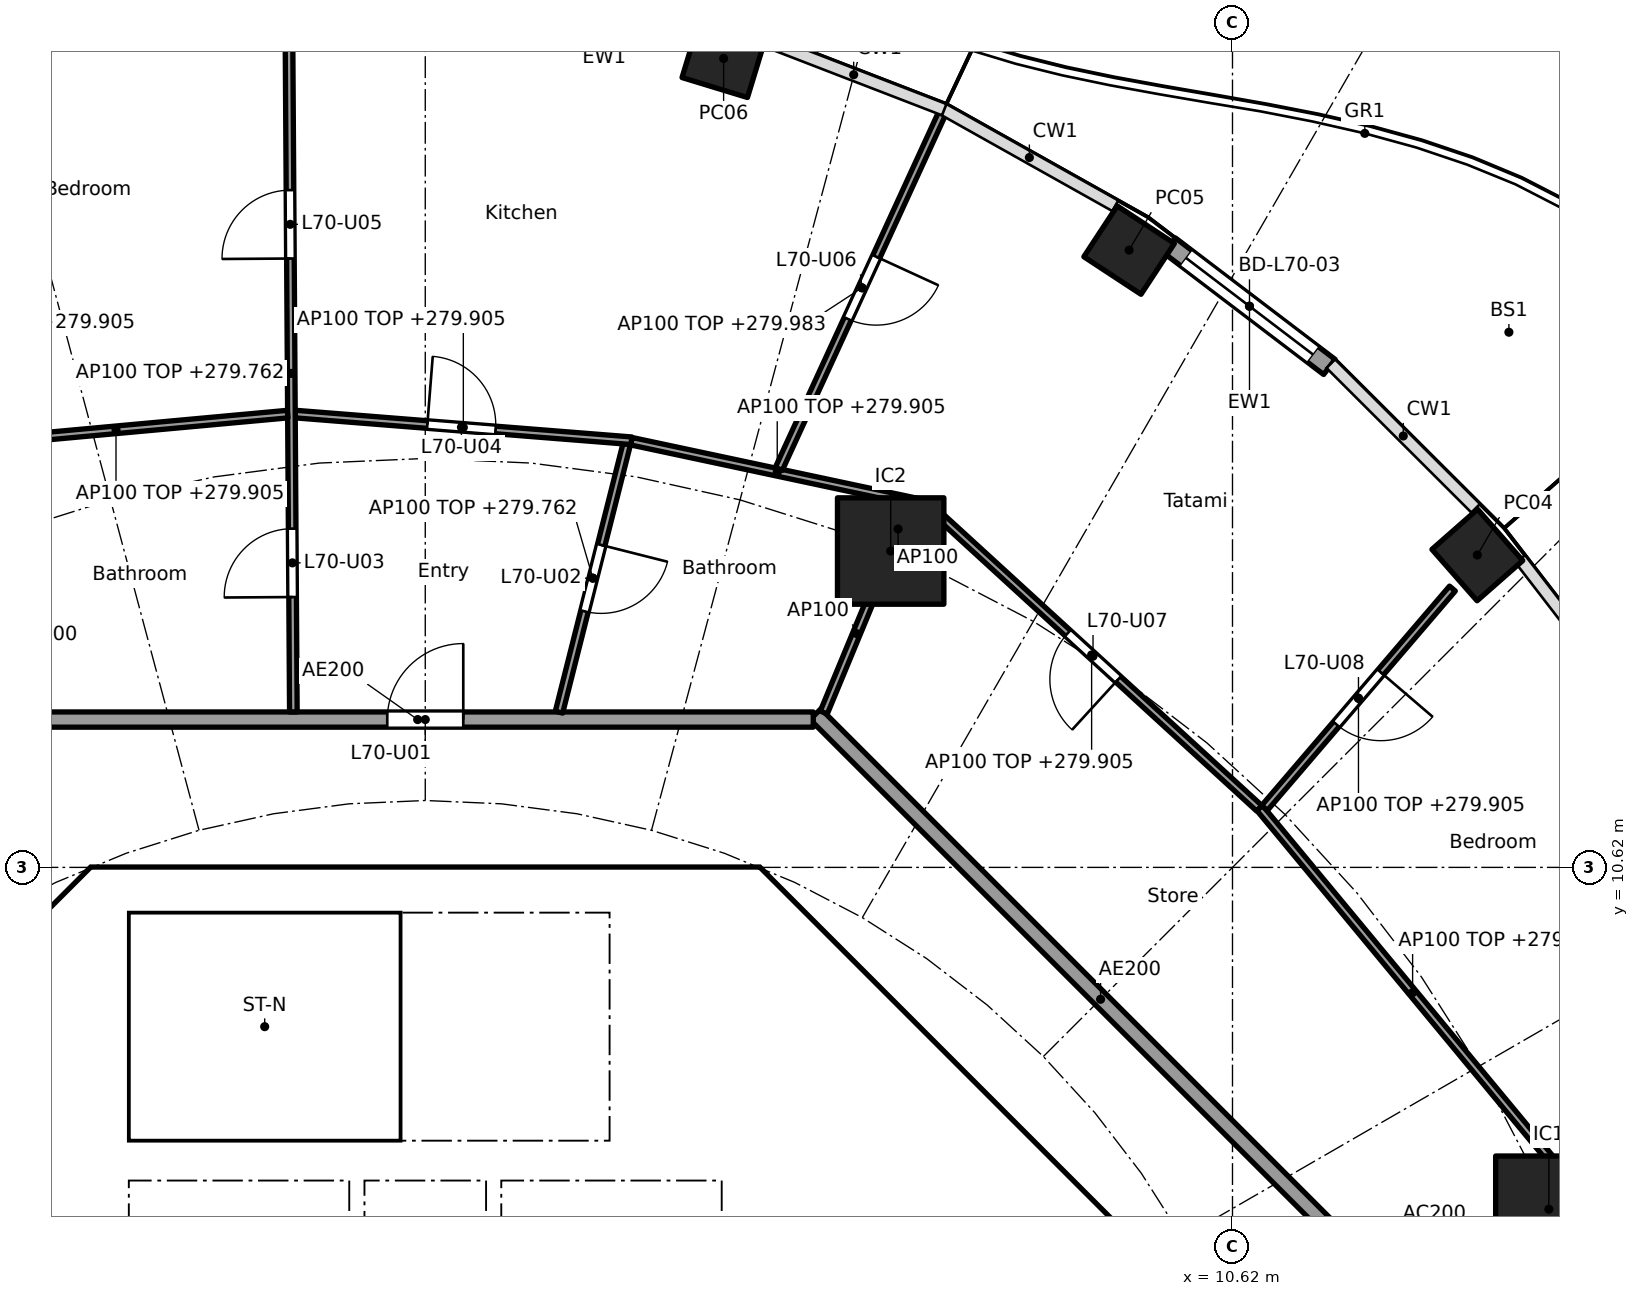
"""IFC4 building model, lengths in metres.
Left out: names, types, materials, properties, quantities, classifications, styles, units other than length and angle.
Written with IfcOpenShell. Run it as: python <this file> out.ifc"""

import sys

from ifc_helpers import new_model, si_unit, direction, frame, frame_2d, origin, origin_2d, place, context, subcontext, project, spatial, polyline, rectangle, hollow_rectangle, outline, extrude, element, fill, save


model = new_model("IFC4")
c1 = context("Model", 3, precision=1e-05, world=origin(), true_north=direction((0.0, 1.0)))
c2 = subcontext(c1, "Body", "Model", "MODEL_VIEW")
j1 = project(units=[si_unit("LENGTHUNIT", "METRE"), si_unit("PLANEANGLEUNIT", "RADIAN")], contexts=[c1])
p1 = place(None, origin())
s1 = spatial("IfcSite", under=j1, at=p1, CompositionType="ELEMENT")
p2 = place(p1, origin())
s2 = spatial("IfcBuilding", under=s1, at=p2, CompositionType="ELEMENT")
p3 = place(p2, frame((0.0, 0.0, 277.0)))
s3 = spatial("IfcBuildingStorey", under=s2, at=p3, CompositionType="ELEMENT", Elevation=277.0)
for number, where, z_axis, x_axis in (
    (1, (13.841, 14.73, 0.0), (0.0, 0.0, 1.0), (-0.66, 0.751, 0.0)),
    (2, (9.26, 18.741, 0.0), (0.0, 0.0, 1.0), (-0.836, 0.549, 0.0)),
    (3, (3.925, 21.262, 0.0), (0.0, 0.0, 1.0), (-0.957, 0.292, 0.0)),
):
    element("IfcColumn", number, at=place(p3, frame(where, z_axis=z_axis, x_axis=x_axis)), inside=s3, PredefinedType="COLUMN", context=c2, shape_type="SweptSolid", body=[
        extrude(hollow_rectangle(XDim=0.9, YDim=0.8, WallThickness=0.028, at=origin_2d()), origin(), (0.0, 0.0, 1.0), 3.7),
    ])
for number, where, z_axis, x_axis in (
    (4, (14.782, 6.123, 0.0), (0.0, 0.0, 1.0), (1.0, 0.0, 0.0)),
    (5, (6.123, 14.782, 0.0), (0.0, 0.0, 1.0), (1.0, 0.0, 0.0)),
):
    element("IfcColumn", number, at=place(p3, frame(where, z_axis=z_axis, x_axis=x_axis)), inside=s3, PredefinedType="COLUMN", context=c2, shape_type="SweptSolid", body=[
        extrude(rectangle(XDim=1.4, YDim=1.4, at=origin_2d()), origin(), (0.0, 0.0, 1.0), 3.7),
    ])
p4 = place(p3, frame((9.792, 18.802, 0.0), z_axis=(0.0, 0.0, 1.0), x_axis=(0.796010739377, -0.605282498339, 0.0)))
e6 = element("IfcWall", 6, at=p4, inside=s3, PredefinedType="SOLIDWALL", context=c2, shape_type="SweptSolid", body=[
    extrude(rectangle(XDim=2.641, YDim=0.25, at=frame_2d((1.32, 0.0))), origin(), (0.0, 0.0, 1.0), 3.44),
])
p5 = place(p4, frame((0.27, 0.0, 0.0)))
e7 = element("IfcOpeningElement", 7, at=p5, cuts=e6, PredefinedType="OPENING", context=c2, shape_type="SweptSolid", body=[
    extrude(rectangle(XDim=2.1, YDim=2.4, at=frame_2d((1.05, 1.2))), frame((0.0, 0.135, 0.0), z_axis=(0.0, -1.0, 0.0), x_axis=(1.0, 0.0, 0.0)), (0.0, 0.0, 1.0), 0.27),
])
p6 = place(p3, frame((9.988, 4.613, 0.0), z_axis=(0.0, 0.0, 1.0), x_axis=(-0.707106781187, 0.707106781187, 0.0)))
e8 = element("IfcWall", 8, at=p6, inside=s3, PredefinedType="SHEAR", context=c2, shape_type="SweptSolid", body=[
    extrude(rectangle(XDim=7.602, YDim=0.6, at=frame_2d((3.801, 0.0))), origin(), (0.0, 0.0, 1.0), 3.44),
])
p7 = place(p6, frame((3.201, 0.0, 0.0)))
e9 = element("IfcOpeningElement", 9, at=p7, cuts=e8, PredefinedType="OPENING", context=c2, shape_type="SweptSolid", body=[
    extrude(rectangle(XDim=1.2, YDim=2.1, at=frame_2d((0.6, 1.05))), frame((0.0, 0.31, 0.0), z_axis=(0.0, -1.0, 0.0), x_axis=(1.0, 0.0, 0.0)), (0.0, 0.0, 1.0), 0.62),
])
p8 = place(p3, frame((-4.613, 9.988, 0.0), z_axis=(0.0, 0.0, 1.0), x_axis=(-0.707106781187, -0.707106781187, 0.0)))
e10 = element("IfcWall", 10, at=p8, inside=s3, PredefinedType="SHEAR", context=c2, shape_type="SweptSolid", body=[
    extrude(rectangle(XDim=7.602, YDim=0.6, at=frame_2d((3.801, 0.0))), origin(), (0.0, 0.0, 1.0), 3.44),
])
p9 = place(p8, frame((0.351, 0.0, 0.0)))
e11 = element("IfcOpeningElement", 11, at=p9, cuts=e10, PredefinedType="OPENING", context=c2, shape_type="SweptSolid", body=[
    extrude(rectangle(XDim=1.1, YDim=2.1, at=frame_2d((0.55, 1.05))), frame((0.0, 0.31, 0.0), z_axis=(0.0, -1.0, 0.0), x_axis=(1.0, 0.0, 0.0)), (0.0, 0.0, 1.0), 0.62),
])
p10 = place(p3, frame((4.0, 4.3, 0.0), z_axis=(0.0, 0.0, 1.0), x_axis=(0.0, 1.0, 0.0)))
e12 = element("IfcWall", 12, at=p10, inside=s3, PredefinedType="SOLIDWALL", context=c2, shape_type="SweptSolid", body=[
    extrude(rectangle(XDim=2.2, YDim=0.2, at=frame_2d((1.1, 0.0))), origin(), (0.0, 0.0, 1.0), 3.44),
])
p11 = place(p10, frame((0.55, 0.0, 0.0)))
e13 = element("IfcOpeningElement", 13, at=p11, cuts=e12, PredefinedType="OPENING", context=c2, shape_type="SweptSolid", body=[
    extrude(rectangle(XDim=1.1, YDim=2.1, at=frame_2d((0.55, 1.05))), frame((0.0, 0.11, 0.0), z_axis=(0.0, -1.0, 0.0), x_axis=(1.0, 0.0, 0.0)), (0.0, 0.0, 1.0), 0.22),
])
p12 = place(p3, frame((-4.0, 4.3, 0.0), z_axis=(0.0, 0.0, 1.0), x_axis=(0.0, 1.0, 0.0)))
e14 = element("IfcWall", 14, at=p12, inside=s3, PredefinedType="SOLIDWALL", context=c2, shape_type="SweptSolid", body=[
    extrude(rectangle(XDim=2.2, YDim=0.2, at=frame_2d((1.1, 0.0))), origin(), (0.0, 0.0, 1.0), 3.44),
])
p13 = place(p12, frame((0.55, 0.0, 0.0)))
e15 = element("IfcOpeningElement", 15, at=p13, cuts=e14, PredefinedType="OPENING", context=c2, shape_type="SweptSolid", body=[
    extrude(rectangle(XDim=1.1, YDim=2.1, at=frame_2d((0.55, 1.05))), frame((0.0, 0.11, 0.0), z_axis=(0.0, -1.0, 0.0), x_axis=(1.0, 0.0, 0.0)), (0.0, 0.0, 1.0), 0.22),
])
p14 = place(p3, frame((4.0, 7.025, 0.0), z_axis=(0.0, 0.0, 1.0), x_axis=(0.0, 1.0, 0.0)))
e16 = element("IfcWall", 16, at=p14, inside=s3, PredefinedType="SOLIDWALL", context=c2, shape_type="SweptSolid", body=[
    extrude(rectangle(XDim=3.0, YDim=0.2, at=frame_2d((1.5, 0.0))), origin(), (0.0, 0.0, 1.0), 3.44),
])
p15 = place(p14, frame((0.925, 0.0, 0.0)))
e17 = element("IfcOpeningElement", 17, at=p15, cuts=e16, PredefinedType="OPENING", context=c2, shape_type="SweptSolid", body=[
    extrude(rectangle(XDim=1.1, YDim=2.1, at=frame_2d((0.55, 1.05))), frame((0.0, 0.11, 0.0), z_axis=(0.0, -1.0, 0.0), x_axis=(1.0, 0.0, 0.0)), (0.0, 0.0, 1.0), 0.22),
])
p16 = place(p3, origin())
e18 = element("IfcWall", 18, at=p16, inside=s3, PredefinedType="SHEAR", context=c2, shape_type="SweptSolid", body=[
    extrude(outline(polyline([(-4.152, 10.025), (-4.401, 9.776), (-4.825, 10.2), (-4.401, 10.625), (4.401, 10.625), (4.825, 10.2), (4.401, 9.776), (4.152, 10.025), (-4.152, 10.025)])), origin(), (0.0, 0.0, 1.0), 3.44),
])
for number, where, z_axis, x_axis in (
    (19, (-0.9, 4.3, 0.0), (0.0, 0.0, 1.0), (0.0, 1.0, 0.0)),
    (20, (0.9, 4.3, 0.0), (0.0, 0.0, 1.0), (0.0, 1.0, 0.0)),
):
    element("IfcWall", number, at=place(p3, frame(where, z_axis=z_axis, x_axis=x_axis)), inside=s3, PredefinedType="SOLIDWALL", context=c2, shape_type="SweptSolid", body=[
        extrude(rectangle(XDim=2.2, YDim=0.2, at=frame_2d((1.1, 0.0))), origin(), (0.0, 0.0, 1.0), 3.44),
    ])
p17 = place(p3, origin())
e21 = element("IfcWall", 21, at=p17, inside=s3, PredefinedType="SOLIDWALL", context=c2, shape_type="SweptSolid", body=[
    extrude(outline(polyline([(-3.9, 7.025), (-4.1, 7.025), (-4.1, 10.025), (-3.9, 10.025), (-3.9, 7.025)])), origin(), (0.0, 0.0, 1.0), 3.44),
])
p18 = place(p3, origin())
e22 = element("IfcWall", 22, at=p18, inside=s3, PredefinedType="SOLIDWALL", context=c2, shape_type="SweptSolid", body=[
    extrude(outline(polyline([(4.1, 6.5), (-4.1, 6.5), (-4.1, 7.025), (4.1, 7.025), (4.1, 6.5)])), origin(), (0.0, 0.0, 1.0), 3.44),
])
p19 = place(p3, frame((12.657, 5.243, 0.0), z_axis=(0.0, 0.0, 1.0), x_axis=(0.923853160736, 0.382747093259, 0.0)))
e23 = element("IfcWall", 23, at=p19, inside=s3, PredefinedType="PARTITIONING", context=c2, shape_type="SweptSolid", body=[
    extrude(rectangle(XDim=2.2, YDim=0.2, at=frame_2d((1.1, 0.0))), origin(), (0.0, 0.0, 1.0), 3.44),
])
p20 = place(p3, frame((14.814, 6.161, 0.0), z_axis=(0.0, 0.0, 1.0), x_axis=(0.638050520313, 0.769994502272, 0.0)))
e24 = element("IfcWall", 24, at=p20, inside=s3, PredefinedType="PARTITIONING", context=c2, shape_type="SweptSolid", body=[
    extrude(rectangle(XDim=3.673, YDim=0.2, at=frame_2d((1.836, 0.0))), origin(), (0.0, 0.0, 1.0), 3.44),
])
p21 = place(p3, frame((12.635, 5.134, 0.0), z_axis=(0.0, 0.0, 1.0), x_axis=(-0.707106781187, 0.707106781187, 0.0)))
e25 = element("IfcWall", 25, at=p21, inside=s3, PredefinedType="PARTITIONING", context=c2, shape_type="SweptSolid", body=[
    extrude(rectangle(XDim=10.609, YDim=0.2, at=frame_2d((5.305, 0.0))), origin(), (0.0, 0.0, 1.0), 3.44),
])
p22 = place(p3, frame((5.104, 12.565, 0.0), z_axis=(0.0, 0.0, 1.0), x_axis=(-1.0, 0.0, 0.0)))
e26 = element("IfcWall", 26, at=p22, inside=s3, PredefinedType="PARTITIONING", context=c2, shape_type="SweptSolid", body=[
    extrude(rectangle(XDim=10.409, YDim=0.2, at=frame_2d((5.205, 0.0))), origin(), (0.0, 0.0, 1.0), 3.44),
])
p23 = place(p22, frame((4.604, 0.0, 0.0)))
e27 = element("IfcOpeningElement", 27, at=p23, cuts=e26, PredefinedType="OPENING", context=c2, shape_type="SweptSolid", body=[
    extrude(rectangle(XDim=1.0, YDim=2.1, at=frame_2d((0.5, 1.05))), frame((0.0, 0.11, 0.0), z_axis=(0.0, -1.0, 0.0), x_axis=(1.0, 0.0, 0.0)), (0.0, 0.0, 1.0), 0.22),
])
p24 = place(p3, frame((15.002, 6.543, 0.0), z_axis=(0.0, 0.0, 1.0), x_axis=(-0.637932656528, 0.770092154054, 0.0)))
e28 = element("IfcWall", 28, at=p24, inside=s3, PredefinedType="PARTITIONING", context=c2, shape_type="SweptSolid", body=[
    extrude(rectangle(XDim=6.311, YDim=0.1, at=frame_2d((3.155, 0.0))), origin(), (0.0, 0.0, 1.0), 2.905),
])
p25 = place(p3, frame((11.041, 11.402, 0.0), z_axis=(0.0, 0.0, 1.0), x_axis=(0.650558544325, 0.759456108282, 0.0)))
e29 = element("IfcWall", 29, at=p25, inside=s3, PredefinedType="PARTITIONING", context=c2, shape_type="SweptSolid", body=[
    extrude(rectangle(XDim=3.8, YDim=0.1, at=frame_2d((1.9, 0.0))), origin(), (0.0, 0.0, 1.0), 2.905),
])
p26 = place(p25, frame((1.45, 0.0, 0.0)))
e30 = element("IfcOpeningElement", 30, at=p26, cuts=e29, PredefinedType="OPENING", context=c2, shape_type="SweptSolid", body=[
    extrude(rectangle(XDim=0.9, YDim=2.1, at=frame_2d((0.45, 1.05))), frame((0.0, 0.06, 0.0), z_axis=(0.0, -1.0, 0.0), x_axis=(1.0, 0.0, 0.0)), (0.0, 0.0, 1.0), 0.12),
])
p27 = place(p3, frame((10.972, 11.398, 0.0), z_axis=(0.0, 0.0, 1.0), x_axis=(-0.737838738013, 0.674977034193, 0.0)))
e31 = element("IfcWall", 31, at=p27, inside=s3, PredefinedType="PARTITIONING", context=c2, shape_type="SweptSolid", body=[
    extrude(rectangle(XDim=5.977, YDim=0.1, at=frame_2d((2.989, 0.0))), origin(), (0.0, 0.0, 1.0), 2.905),
])
p28 = place(p27, frame((2.514, 0.0, 0.0)))
e32 = element("IfcOpeningElement", 32, at=p28, cuts=e31, PredefinedType="OPENING", context=c2, shape_type="SweptSolid", body=[
    extrude(rectangle(XDim=0.9, YDim=2.1, at=frame_2d((0.45, 1.05))), frame((0.0, 0.06, 0.0), z_axis=(0.0, -1.0, 0.0), x_axis=(1.0, 0.0, 0.0)), (0.0, 0.0, 1.0), 0.12),
])
p29 = place(p3, frame((5.243, 12.657, 0.0), z_axis=(0.0, 0.0, 1.0), x_axis=(0.382719158442, 0.923864733477, 0.0)))
e33 = element("IfcWall", 33, at=p29, inside=s3, PredefinedType="PARTITIONING", context=c2, shape_type="SweptSolid", body=[
    extrude(rectangle(XDim=2.25, YDim=0.1, at=frame_2d((1.125, 0.0))), origin(), (0.0, 0.0, 1.0), 3.44),
])
p30 = place(p3, frame((6.55, 15.409, 0.0), z_axis=(0.0, 0.0, 1.0), x_axis=(-0.978051195976, 0.208364723621, 0.0)))
e34 = element("IfcWall", 34, at=p30, inside=s3, PredefinedType="PARTITIONING", context=c2, shape_type="SweptSolid", body=[
    extrude(rectangle(XDim=3.924, YDim=0.1, at=frame_2d((1.962, 0.0))), origin(), (0.0, 0.0, 1.0), 2.905),
])
p31 = place(p3, frame((4.651, 15.863, 0.0), z_axis=(0.0, 0.0, 1.0), x_axis=(0.41744196735, 0.908703584176, 0.0)))
e35 = element("IfcWall", 35, at=p31, inside=s3, PredefinedType="PARTITIONING", context=c2, shape_type="SweptSolid", body=[
    extrude(rectangle(XDim=5.242, YDim=0.1, at=frame_2d((2.621, 0.0))), origin(), (0.0, 0.0, 1.0), 2.983),
])
p32 = place(p31, frame((2.171, 0.0, 0.0)))
e36 = element("IfcOpeningElement", 36, at=p32, cuts=e35, PredefinedType="OPENING", context=c2, shape_type="SweptSolid", body=[
    extrude(rectangle(XDim=0.9, YDim=2.1, at=frame_2d((0.45, 1.05))), frame((0.0, 0.06, 0.0), z_axis=(0.0, -1.0, 0.0), x_axis=(1.0, 0.0, 0.0)), (0.0, 0.0, 1.0), 0.12),
])
p33 = place(p3, frame((1.759, 12.662, 0.0), z_axis=(0.0, 0.0, 1.0), x_axis=(0.244966765147, 0.969531476525, 0.0)))
e37 = element("IfcWall", 37, at=p33, inside=s3, PredefinedType="PARTITIONING", context=c2, shape_type="SweptSolid", body=[
    extrude(rectangle(XDim=3.638, YDim=0.1, at=frame_2d((1.819, 0.0))), origin(), (0.0, 0.0, 1.0), 2.762),
])
p34 = place(p33, frame((1.369, 0.0, 0.0)))
e38 = element("IfcOpeningElement", 38, at=p34, cuts=e37, PredefinedType="OPENING", context=c2, shape_type="SweptSolid", body=[
    extrude(rectangle(XDim=0.9, YDim=2.1, at=frame_2d((0.45, 1.05))), frame((0.0, 0.06, 0.0), z_axis=(0.0, -1.0, 0.0), x_axis=(1.0, 0.0, 0.0)), (0.0, 0.0, 1.0), 0.12),
])
p35 = place(p3, frame((2.713, 16.233, 0.0), z_axis=(0.0, 0.0, 1.0), x_axis=(-0.996870142942, 0.079056423588, 0.0)))
e39 = element("IfcWall", 39, at=p35, inside=s3, PredefinedType="PARTITIONING", context=c2, shape_type="SweptSolid", body=[
    extrude(rectangle(XDim=4.438, YDim=0.1, at=frame_2d((2.219, 0.0))), origin(), (0.0, 0.0, 1.0), 2.905),
])
p36 = place(p35, frame((1.794, 0.0, 0.0)))
e40 = element("IfcOpeningElement", 40, at=p36, cuts=e39, PredefinedType="OPENING", context=c2, shape_type="SweptSolid", body=[
    extrude(rectangle(XDim=0.9, YDim=2.1, at=frame_2d((0.45, 1.05))), frame((0.0, 0.06, 0.0), z_axis=(0.0, -1.0, 0.0), x_axis=(1.0, 0.0, 0.0)), (0.0, 0.0, 1.0), 0.12),
])
p37 = place(p3, frame((-1.736, 12.665, 0.0), z_axis=(0.0, 0.0, 1.0), x_axis=(-0.00646827636, 0.999979080482, 0.0)))
e41 = element("IfcWall", 41, at=p37, inside=s3, PredefinedType="PARTITIONING", context=c2, shape_type="SweptSolid", body=[
    extrude(rectangle(XDim=8.908, YDim=0.1, at=frame_2d((4.454, 0.0))), origin(), (0.0, 0.0, 1.0), 2.762),
])
p38 = place(p37, frame((1.512, 0.0, 0.0)))
e42 = element("IfcOpeningElement", 42, at=p38, cuts=e41, PredefinedType="OPENING", context=c2, shape_type="SweptSolid", body=[
    extrude(rectangle(XDim=0.9, YDim=2.1, at=frame_2d((0.45, 1.05))), frame((0.0, 0.06, 0.0), z_axis=(0.0, -1.0, 0.0), x_axis=(1.0, 0.0, 0.0)), (0.0, 0.0, 1.0), 0.12),
])
p39 = place(p37, frame((5.965, 0.0, 0.0)))
e43 = element("IfcOpeningElement", 43, at=p39, cuts=e41, PredefinedType="OPENING", context=c2, shape_type="SweptSolid", body=[
    extrude(rectangle(XDim=0.9, YDim=2.1, at=frame_2d((0.45, 1.05))), frame((0.0, 0.06, 0.0), z_axis=(0.0, -1.0, 0.0), x_axis=(1.0, 0.0, 0.0)), (0.0, 0.0, 1.0), 0.12),
])
p40 = place(p3, frame((-1.811, 16.583, 0.0), z_axis=(0.0, 0.0, 1.0), x_axis=(-0.995842301034, -0.091093970555, 0.0)))
e44 = element("IfcWall", 44, at=p40, inside=s3, PredefinedType="PARTITIONING", context=c2, shape_type="SweptSolid", body=[
    extrude(rectangle(XDim=4.535, YDim=0.1, at=frame_2d((2.267, 0.0))), origin(), (0.0, 0.0, 1.0), 2.905),
])
p41 = place(p3, frame((6.388, 15.29, 0.0), z_axis=(0.0, 0.0, 1.0), x_axis=(-0.610612392422, -0.791929609385, 0.0)))
e45 = element("IfcWall", 45, at=p41, inside=s3, PredefinedType="PARTITIONING", context=c2, shape_type="SweptSolid", body=[
    extrude(rectangle(XDim=0.549, YDim=0.1, at=frame_2d((0.275, 0.0))), origin(), (0.0, 0.0, 1.0), 3.44),
])
p42 = place(p5, origin())
e46 = element("IfcDoor", 46, at=p42, inside=s3, OperationType="SLIDING_TO_LEFT", PredefinedType="DOOR", context=c2, shape_type="SweptSolid", body=[
    extrude(rectangle(XDim=2.1, YDim=2.4, at=frame_2d((1.05, 1.2))), frame((0.0, 0.025, 0.0), z_axis=(0.0, -1.0, 0.0), x_axis=(1.0, 0.0, 0.0)), (0.0, 0.0, 1.0), 0.05),
])
fill(e7, e46)
p43 = place(p15, origin())
e47 = element("IfcDoor", 47, at=p43, inside=s3, OperationType="SINGLE_SWING_LEFT", PredefinedType="DOOR", context=c2, shape_type="SweptSolid", body=[
    extrude(rectangle(XDim=1.1, YDim=2.1, at=frame_2d((0.55, 1.05))), frame((0.0, 0.025, 0.0), z_axis=(0.0, -1.0, 0.0), x_axis=(1.0, 0.0, 0.0)), (0.0, 0.0, 1.0), 0.05),
])
fill(e17, e47)
p44 = place(p7, origin())
e48 = element("IfcDoor", 48, at=p44, inside=s3, OperationType="SINGLE_SWING_RIGHT", PredefinedType="DOOR", context=c2, shape_type="SweptSolid", body=[
    extrude(rectangle(XDim=1.2, YDim=2.1, at=frame_2d((0.6, 1.05))), frame((0.0, 0.025, 0.0), z_axis=(0.0, -1.0, 0.0), x_axis=(1.0, 0.0, 0.0)), (0.0, 0.0, 1.0), 0.05),
])
fill(e9, e48)
p45 = place(p9, origin())
e49 = element("IfcDoor", 49, at=p45, inside=s3, OperationType="SINGLE_SWING_RIGHT", PredefinedType="DOOR", context=c2, shape_type="SweptSolid", body=[
    extrude(rectangle(XDim=1.1, YDim=2.1, at=frame_2d((0.55, 1.05))), frame((0.0, 0.025, 0.0), z_axis=(0.0, -1.0, 0.0), x_axis=(1.0, 0.0, 0.0)), (0.0, 0.0, 1.0), 0.05),
])
fill(e11, e49)
p46 = place(p23, frame((1.0, 0.0, 0.0), x_axis=(-1.0, 0.0, 0.0)))
e50 = element("IfcDoor", 50, at=p46, inside=s3, OperationType="SINGLE_SWING_RIGHT", PredefinedType="DOOR", context=c2, shape_type="SweptSolid", body=[
    extrude(rectangle(XDim=1.0, YDim=2.1, at=frame_2d((0.5, 1.05))), frame((0.0, 0.025, 0.0), z_axis=(0.0, -1.0, 0.0), x_axis=(1.0, 0.0, 0.0)), (0.0, 0.0, 1.0), 0.05),
])
fill(e27, e50)
p47 = place(p34, frame((0.9, 0.0, 0.0), x_axis=(-1.0, 0.0, 0.0)))
e51 = element("IfcDoor", 51, at=p47, inside=s3, OperationType="SINGLE_SWING_LEFT", PredefinedType="DOOR", context=c2, shape_type="SweptSolid", body=[
    extrude(rectangle(XDim=0.9, YDim=2.1, at=frame_2d((0.45, 1.05))), frame((0.0, 0.025, 0.0), z_axis=(0.0, -1.0, 0.0), x_axis=(1.0, 0.0, 0.0)), (0.0, 0.0, 1.0), 0.05),
])
fill(e38, e51)
p48 = place(p38, origin())
e52 = element("IfcDoor", 52, at=p48, inside=s3, OperationType="SINGLE_SWING_LEFT", PredefinedType="DOOR", context=c2, shape_type="SweptSolid", body=[
    extrude(rectangle(XDim=0.9, YDim=2.1, at=frame_2d((0.45, 1.05))), frame((0.0, 0.025, 0.0), z_axis=(0.0, -1.0, 0.0), x_axis=(1.0, 0.0, 0.0)), (0.0, 0.0, 1.0), 0.05),
])
fill(e42, e52)
p49 = place(p36, frame((0.9, 0.0, 0.0), x_axis=(-1.0, 0.0, 0.0)))
e53 = element("IfcDoor", 53, at=p49, inside=s3, OperationType="SINGLE_SWING_LEFT", PredefinedType="DOOR", context=c2, shape_type="SweptSolid", body=[
    extrude(rectangle(XDim=0.9, YDim=2.1, at=frame_2d((0.45, 1.05))), frame((0.0, 0.025, 0.0), z_axis=(0.0, -1.0, 0.0), x_axis=(1.0, 0.0, 0.0)), (0.0, 0.0, 1.0), 0.05),
])
fill(e40, e53)
p50 = place(p39, origin())
e54 = element("IfcDoor", 54, at=p50, inside=s3, OperationType="SINGLE_SWING_LEFT", PredefinedType="DOOR", context=c2, shape_type="SweptSolid", body=[
    extrude(rectangle(XDim=0.9, YDim=2.1, at=frame_2d((0.45, 1.05))), frame((0.0, 0.025, 0.0), z_axis=(0.0, -1.0, 0.0), x_axis=(1.0, 0.0, 0.0)), (0.0, 0.0, 1.0), 0.05),
])
fill(e43, e54)
p51 = place(p32, frame((0.9, 0.0, 0.0), x_axis=(-1.0, 0.0, 0.0)))
e55 = element("IfcDoor", 55, at=p51, inside=s3, OperationType="SINGLE_SWING_LEFT", PredefinedType="DOOR", context=c2, shape_type="SweptSolid", body=[
    extrude(rectangle(XDim=0.9, YDim=2.1, at=frame_2d((0.45, 1.05))), frame((0.0, 0.025, 0.0), z_axis=(0.0, -1.0, 0.0), x_axis=(1.0, 0.0, 0.0)), (0.0, 0.0, 1.0), 0.05),
])
fill(e36, e55)
p52 = place(p28, origin())
e56 = element("IfcDoor", 56, at=p52, inside=s3, OperationType="SINGLE_SWING_LEFT", PredefinedType="DOOR", context=c2, shape_type="SweptSolid", body=[
    extrude(rectangle(XDim=0.9, YDim=2.1, at=frame_2d((0.45, 1.05))), frame((0.0, 0.025, 0.0), z_axis=(0.0, -1.0, 0.0), x_axis=(1.0, 0.0, 0.0)), (0.0, 0.0, 1.0), 0.05),
])
fill(e32, e56)
p53 = place(p26, frame((0.9, 0.0, 0.0), x_axis=(-1.0, 0.0, 0.0)))
e57 = element("IfcDoor", 57, at=p53, inside=s3, OperationType="SINGLE_SWING_LEFT", PredefinedType="DOOR", context=c2, shape_type="SweptSolid", body=[
    extrude(rectangle(XDim=0.9, YDim=2.1, at=frame_2d((0.45, 1.05))), frame((0.0, 0.025, 0.0), z_axis=(0.0, -1.0, 0.0), x_axis=(1.0, 0.0, 0.0)), (0.0, 0.0, 1.0), 0.05),
])
fill(e30, e57)
save(model, sys.argv[1])
